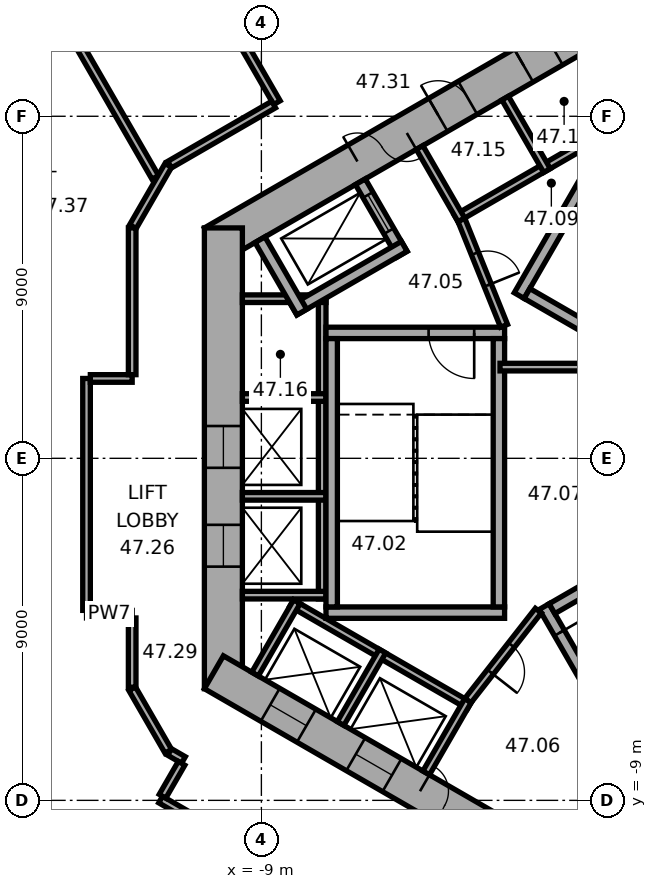
"""IFC4 building model, lengths in metres.
Left out: names, types, materials, properties, quantities, classifications, styles, units other than length and angle.
Written with IfcOpenShell. Run it as: python <this file> out.ifc"""

import sys

from ifc_helpers import new_model, si_unit, direction, frame, frame_2d, origin, place, context, subcontext, project, spatial, rectangle, extrude, element, fill, save


model = new_model("IFC4")
c1 = context("Model", 3, precision=1e-05, world=origin(), true_north=direction((0.0, 1.0)))
c2 = subcontext(c1, "Body", "Model", "MODEL_VIEW")
j1 = project(units=[si_unit("LENGTHUNIT", "METRE"), si_unit("PLANEANGLEUNIT", "RADIAN")], contexts=[c1])
p1 = place(None, origin())
s1 = spatial("IfcSite", under=j1, at=p1, CompositionType="ELEMENT")
p2 = place(p1, origin())
s2 = spatial("IfcBuilding", under=s1, at=p2, CompositionType="ELEMENT")
p3 = place(p2, frame((0.0, 0.0, 191.0)))
s3 = spatial("IfcBuildingStorey", under=s2, at=p3, CompositionType="ELEMENT", Elevation=191.0)
p4 = place(p3, frame((0.25, 11.691, 0.0), z_axis=(0.0, 0.0, 1.0), x_axis=(-0.866022616891, -0.50000482701, 0.0)))
e1 = element("IfcWall", 1, at=p4, inside=s3, PredefinedType="SHEAR", context=c2, shape_type="SweptSolid", body=[
    extrude(rectangle(XDim=12.125, YDim=1.0, at=frame_2d((6.062, 0.0))), origin(), (0.0, 0.0, 1.0), 3.7),
])
p5 = place(p4, frame((6.262, 0.0, 0.0)))
e2 = element("IfcOpeningElement", 2, at=p5, cuts=e1, PredefinedType="OPENING", context=c2, shape_type="SweptSolid", body=[
    extrude(rectangle(XDim=1.5, YDim=2.1, at=frame_2d((0.75, 1.05))), frame((0.0, 0.51, 0.0), z_axis=(0.0, -1.0, 0.0), x_axis=(1.0, 0.0, 0.0)), (0.0, 0.0, 1.0), 1.02),
])
p6 = place(p4, frame((1.812, 0.0, 0.0)))
e3 = element("IfcOpeningElement", 3, at=p6, cuts=e1, PredefinedType="OPENING", context=c2, shape_type="SweptSolid", body=[
    extrude(rectangle(XDim=0.9, YDim=2.1, at=frame_2d((0.45, 1.05))), frame((0.0, 0.51, 0.0), z_axis=(0.0, -1.0, 0.0), x_axis=(1.0, 0.0, 0.0)), (0.0, 0.0, 1.0), 1.02),
])
p7 = place(p4, frame((4.412, 0.0, 0.0)))
e4 = element("IfcOpeningElement", 4, at=p7, cuts=e1, PredefinedType="OPENING", context=c2, shape_type="SweptSolid", body=[
    extrude(rectangle(XDim=0.9, YDim=2.1, at=frame_2d((0.45, 1.05))), frame((0.0, 0.51, 0.0), z_axis=(0.0, -1.0, 0.0), x_axis=(1.0, 0.0, 0.0)), (0.0, 0.0, 1.0), 1.02),
])
p8 = place(p3, frame((-10.0, 6.062, 0.0), z_axis=(0.0, 0.0, 1.0), x_axis=(0.0, -1.0, 0.0)))
e5 = element("IfcWall", 5, at=p8, inside=s3, PredefinedType="SHEAR", context=c2, shape_type="SweptSolid", body=[
    extrude(rectangle(XDim=12.125, YDim=1.0, at=frame_2d((6.062, 0.0))), origin(), (0.0, 0.0, 1.0), 3.7),
])
p9 = place(p8, frame((5.212, 0.0, 0.0)))
e6 = element("IfcOpeningElement", 6, at=p9, cuts=e5, PredefinedType="OPENING", context=c2, shape_type="SweptSolid", body=[
    extrude(rectangle(XDim=1.1, YDim=2.1, at=frame_2d((0.55, 1.05))), frame((0.0, 0.51, 0.0), z_axis=(0.0, -1.0, 0.0), x_axis=(1.0, 0.0, 0.0)), (0.0, 0.0, 1.0), 1.02),
])
p10 = place(p8, frame((7.812, 0.0, 0.0)))
e7 = element("IfcOpeningElement", 7, at=p10, cuts=e5, PredefinedType="OPENING", context=c2, shape_type="SweptSolid", body=[
    extrude(rectangle(XDim=1.1, YDim=2.1, at=frame_2d((0.55, 1.05))), frame((0.0, 0.51, 0.0), z_axis=(0.0, -1.0, 0.0), x_axis=(1.0, 0.0, 0.0)), (0.0, 0.0, 1.0), 1.02),
])
p11 = place(p3, frame((-10.25, -5.629, 0.0), z_axis=(0.0, 0.0, 1.0), x_axis=(0.866022616891, -0.50000482701, 0.0)))
e8 = element("IfcWall", 8, at=p11, inside=s3, PredefinedType="SHEAR", context=c2, shape_type="SweptSolid", body=[
    extrude(rectangle(XDim=12.125, YDim=1.0, at=frame_2d((6.062, 0.0))), origin(), (0.0, 0.0, 1.0), 3.7),
])
p12 = place(p11, frame((6.262, 0.0, 0.0)))
e9 = element("IfcOpeningElement", 9, at=p12, cuts=e8, PredefinedType="OPENING", context=c2, shape_type="SweptSolid", body=[
    extrude(rectangle(XDim=1.5, YDim=2.1, at=frame_2d((0.75, 1.05))), frame((0.0, 0.51, 0.0), z_axis=(0.0, -1.0, 0.0), x_axis=(1.0, 0.0, 0.0)), (0.0, 0.0, 1.0), 1.02),
])
p13 = place(p11, frame((1.712, 0.0, 0.0)))
e10 = element("IfcOpeningElement", 10, at=p13, cuts=e8, PredefinedType="OPENING", context=c2, shape_type="SweptSolid", body=[
    extrude(rectangle(XDim=1.1, YDim=2.1, at=frame_2d((0.55, 1.05))), frame((0.0, 0.51, 0.0), z_axis=(0.0, -1.0, 0.0), x_axis=(1.0, 0.0, 0.0)), (0.0, 0.0, 1.0), 1.02),
])
p14 = place(p11, frame((4.312, 0.0, 0.0)))
e11 = element("IfcOpeningElement", 11, at=p14, cuts=e8, PredefinedType="OPENING", context=c2, shape_type="SweptSolid", body=[
    extrude(rectangle(XDim=1.1, YDim=2.1, at=frame_2d((0.55, 1.05))), frame((0.0, 0.51, 0.0), z_axis=(0.0, -1.0, 0.0), x_axis=(1.0, 0.0, 0.0)), (0.0, 0.0, 1.0), 1.02),
])
p15 = place(p3, frame((0.803, 9.009, 0.0), z_axis=(0.0, 0.0, 1.0), x_axis=(-0.866028230842, -0.499995103361, 0.0)))
e12 = element("IfcWall", 12, at=p15, inside=s3, PredefinedType="PARTITIONING", context=c2, shape_type="SweptSolid", body=[
    extrude(rectangle(XDim=5.4, YDim=0.2, at=frame_2d((2.7, 0.0))), origin(), (0.0, 0.0, 1.0), 3.42),
])
for number, where, z_axis, x_axis in (
    (13, (-1.485, 7.572, 0.0), (0.0, 0.0, 1.0), (-0.5, 0.866, 0.0)),
    (14, (-3.737, 6.272, 0.0), (0.0, 0.0, 1.0), (-0.5, 0.866, 0.0)),
):
    element("IfcWall", number, at=place(p3, frame(where, z_axis=z_axis, x_axis=x_axis)), inside=s3, PredefinedType="PARTITIONING", context=c2, shape_type="SweptSolid", body=[
        extrude(rectangle(XDim=2.2, YDim=0.2, at=frame_2d((1.1, 0.0))), origin(), (0.0, 0.0, 1.0), 3.42),
    ])
p16 = place(p3, frame((-7.4, 4.3, 0.0), z_axis=(0.0, 0.0, 1.0), x_axis=(0.0, -1.0, 0.0)))
e15 = element("IfcWall", 15, at=p16, inside=s3, PredefinedType="PARTITIONING", context=c2, shape_type="SweptSolid", body=[
    extrude(rectangle(XDim=8.0, YDim=0.2, at=frame_2d((4.0, 0.0))), origin(), (0.0, 0.0, 1.0), 3.42),
])
for number, where, z_axis, x_axis in (
    (16, (-7.3, 4.2, 0.0), (0.0, 0.0, 1.0), (-1.0, 0.0, 0.0)),
    (17, (-7.3, 1.6, 0.0), (0.0, 0.0, 1.0), (-1.0, 0.0, 0.0)),
    (18, (-7.3, -1.0, 0.0), (0.0, 0.0, 1.0), (-1.0, 0.0, 0.0)),
    (19, (-7.3, -3.6, 0.0), (0.0, 0.0, 1.0), (-1.0, 0.0, 0.0)),
):
    element("IfcWall", number, at=place(p3, frame(where, z_axis=z_axis, x_axis=x_axis)), inside=s3, PredefinedType="PARTITIONING", context=c2, shape_type="SweptSolid", body=[
        extrude(rectangle(XDim=2.2, YDim=0.2, at=frame_2d((1.1, 0.0))), origin(), (0.0, 0.0, 1.0), 3.42),
    ])
p17 = place(p3, frame((-8.203, -3.809, 0.0), z_axis=(0.0, 0.0, 1.0), x_axis=(0.866028230842, -0.499995103361, 0.0)))
e20 = element("IfcWall", 20, at=p17, inside=s3, PredefinedType="PARTITIONING", context=c2, shape_type="SweptSolid", body=[
    extrude(rectangle(XDim=5.4, YDim=0.2, at=frame_2d((2.7, 0.0))), origin(), (0.0, 0.0, 1.0), 3.42),
])
for number, where, z_axis, x_axis in (
    (21, (-8.067, -3.772, 0.0), (0.0, 0.0, 1.0), (-0.5, -0.866, 0.0)),
    (22, (-5.815, -5.072, 0.0), (0.0, 0.0, 1.0), (-0.5, -0.866, 0.0)),
):
    element("IfcWall", number, at=place(p3, frame(where, z_axis=z_axis, x_axis=x_axis)), inside=s3, PredefinedType="PARTITIONING", context=c2, shape_type="SweptSolid", body=[
        extrude(rectangle(XDim=2.2, YDim=0.2, at=frame_2d((1.1, 0.0))), origin(), (0.0, 0.0, 1.0), 3.42),
    ])
p18 = place(p3, frame((-3.563, -6.372, 0.0), z_axis=(0.0, 0.0, 1.0), x_axis=(-0.499994660107, -0.866028486751, 0.0)))
e23 = element("IfcWall", 23, at=p18, inside=s3, PredefinedType="PARTITIONING", context=c2, shape_type="SweptSolid", body=[
    extrude(rectangle(XDim=2.2, YDim=0.2, at=frame_2d((1.1, 0.0))), origin(), (0.0, 0.0, 1.0), 3.42),
])
p19 = place(p3, frame((-2.216, 4.282, 0.0), z_axis=(0.0, 0.0, 1.0), x_axis=(0.499977259774, 0.866038532462, 0.0)))
e24 = element("IfcWall", 24, at=p19, inside=s3, PredefinedType="SHEAR", context=c2, shape_type="SweptSolid", body=[
    extrude(rectangle(XDim=4.7, YDim=0.3, at=frame_2d((2.35, 0.0))), origin(), (0.0, 0.0, 1.0), 3.42),
])
p20 = place(p3, frame((4.103, 0.807, 0.0), z_axis=(0.0, 0.0, 1.0), x_axis=(-0.866027801685, 0.499995846692, 0.0)))
e25 = element("IfcWall", 25, at=p20, inside=s3, PredefinedType="SHEAR", context=c2, shape_type="SweptSolid", body=[
    extrude(rectangle(XDim=7.06, YDim=0.3, at=frame_2d((3.53, 0.0))), origin(), (0.0, 0.0, 1.0), 3.42),
])
p21 = place(p3, frame((-2.6, 3.3, 0.0), z_axis=(0.0, 0.0, 1.0), x_axis=(-1.0, 0.0, 0.0)))
e26 = element("IfcWall", 26, at=p21, inside=s3, PredefinedType="SHEAR", context=c2, shape_type="SweptSolid", body=[
    extrude(rectangle(XDim=4.7, YDim=0.3, at=frame_2d((2.35, 0.0))), origin(), (0.0, 0.0, 1.0), 3.42),
])
p22 = place(p21, frame((0.8, 0.0, 0.0)))
e27 = element("IfcOpeningElement", 27, at=p22, cuts=e26, PredefinedType="OPENING", context=c2, shape_type="SweptSolid", body=[
    extrude(rectangle(XDim=1.2, YDim=2.1, at=frame_2d((0.6, 1.05))), frame((0.0, 0.16, 0.0), z_axis=(0.0, -1.0, 0.0), x_axis=(1.0, 0.0, 0.0)), (0.0, 0.0, 1.0), 0.32),
])
p23 = place(p3, frame((-2.6, -4.06, 0.0), z_axis=(0.0, 0.0, 1.0), x_axis=(-1.0, 0.0, 0.0)))
e28 = element("IfcWall", 28, at=p23, inside=s3, PredefinedType="SHEAR", context=c2, shape_type="SweptSolid", body=[
    extrude(rectangle(XDim=4.7, YDim=0.3, at=frame_2d((2.35, 0.0))), origin(), (0.0, 0.0, 1.0), 3.42),
])
for number, where, z_axis, x_axis in (
    (29, (-2.75, 3.15, 0.0), (0.0, 0.0, 1.0), (0.0, -1.0, 0.0)),
    (30, (-7.15, 3.15, 0.0), (0.0, 0.0, 1.0), (0.0, -1.0, 0.0)),
):
    element("IfcWall", number, at=place(p3, frame(where, z_axis=z_axis, x_axis=x_axis)), inside=s3, PredefinedType="SHEAR", context=c2, shape_type="SweptSolid", body=[
        extrude(rectangle(XDim=7.06, YDim=0.3, at=frame_2d((3.53, 0.0))), origin(), (0.0, 0.0, 1.0), 3.42),
    ])
p24 = place(p3, frame((-1.558, -3.902, 0.0), z_axis=(0.0, 0.0, 1.0), x_axis=(0.499977259774, -0.866038532462, 0.0)))
e31 = element("IfcWall", 31, at=p24, inside=s3, PredefinedType="SHEAR", context=c2, shape_type="SweptSolid", body=[
    extrude(rectangle(XDim=4.7, YDim=0.3, at=frame_2d((2.35, 0.0))), origin(), (0.0, 0.0, 1.0), 3.42),
])
p25 = place(p24, frame((0.8, 0.0, 0.0)))
e32 = element("IfcOpeningElement", 32, at=p25, cuts=e31, PredefinedType="OPENING", context=c2, shape_type="SweptSolid", body=[
    extrude(rectangle(XDim=1.2, YDim=2.1, at=frame_2d((0.6, 1.05))), frame((0.0, 0.16, 0.0), z_axis=(0.0, -1.0, 0.0), x_axis=(1.0, 0.0, 0.0)), (0.0, 0.0, 1.0), 0.32),
])
p26 = place(p3, frame((-1.353, -3.957, 0.0), z_axis=(0.0, 0.0, 1.0), x_axis=(0.866027801685, 0.499995846692, 0.0)))
e33 = element("IfcWall", 33, at=p26, inside=s3, PredefinedType="SHEAR", context=c2, shape_type="SweptSolid", body=[
    extrude(rectangle(XDim=7.06, YDim=0.3, at=frame_2d((3.53, 0.0))), origin(), (0.0, 0.0, 1.0), 3.42),
])
p27 = place(p3, frame((-5.295, 5.372, 0.0), z_axis=(0.0, 0.0, 1.0), x_axis=(-0.500077893725, 0.86598042715, 0.0)))
e34 = element("IfcWall", 34, at=p27, inside=s3, PredefinedType="SHEAR", context=c2, shape_type="SweptSolid", body=[
    extrude(rectangle(XDim=2.2, YDim=0.3, at=frame_2d((1.1, 0.0))), origin(), (0.0, 0.0, 1.0), 3.42),
])
p28 = place(p27, frame((0.7, 0.0, 0.0)))
e35 = element("IfcOpeningElement", 35, at=p28, cuts=e34, PredefinedType="OPENING", context=c2, shape_type="SweptSolid", body=[
    extrude(rectangle(XDim=1.1, YDim=2.1, at=frame_2d((0.55, 1.05))), frame((0.0, 0.16, 0.0), z_axis=(0.0, -1.0, 0.0), x_axis=(1.0, 0.0, 0.0)), (0.0, 0.0, 1.0), 0.32),
])
p29 = place(p3, frame((-5.24, 5.577, 0.0), z_axis=(0.0, 0.0, 1.0), x_axis=(-0.866014461049, -0.500018952895, 0.0)))
e36 = element("IfcWall", 36, at=p29, inside=s3, PredefinedType="SHEAR", context=c2, shape_type="SweptSolid", body=[
    extrude(rectangle(XDim=3.35, YDim=0.3, at=frame_2d((1.675, 0.0))), origin(), (0.0, 0.0, 1.0), 3.42),
])
p30 = place(p3, frame((-7.937, 3.847, 0.0), z_axis=(0.0, 0.0, 1.0), x_axis=(-0.50002983664, 0.866008176907, 0.0)))
e37 = element("IfcWall", 37, at=p30, inside=s3, PredefinedType="SHEAR", context=c2, shape_type="SweptSolid", body=[
    extrude(rectangle(XDim=2.2, YDim=0.3, at=frame_2d((1.1, 0.0))), origin(), (0.0, 0.0, 1.0), 3.42),
])
p31 = place(p3, frame((-2.615, 3.487, 0.0), z_axis=(0.0, 0.0, 1.0), x_axis=(-0.373576831041, 0.92759924068, 0.0)))
e38 = element("IfcWall", 38, at=p31, inside=s3, PredefinedType="PARTITIONING", context=c2, shape_type="SweptSolid", body=[
    extrude(rectangle(XDim=3.002, YDim=0.2, at=frame_2d((1.501, 0.0))), origin(), (0.0, 0.0, 1.0), 3.42),
])
p32 = place(p31, frame((1.15, 0.0, 0.0)))
e39 = element("IfcOpeningElement", 39, at=p32, cuts=e38, PredefinedType="OPENING", context=c2, shape_type="SweptSolid", body=[
    extrude(rectangle(XDim=0.9, YDim=2.1, at=frame_2d((0.45, 1.05))), frame((0.0, 0.11, 0.0), z_axis=(0.0, -1.0, 0.0), x_axis=(1.0, 0.0, 0.0)), (0.0, 0.0, 1.0), 0.22),
])
p33 = place(p3, frame((-1.712, -4.008, 0.0), z_axis=(0.0, 0.0, 1.0), x_axis=(-0.616549420702, -0.787316208287, 0.0)))
e40 = element("IfcWall", 40, at=p33, inside=s3, PredefinedType="PARTITIONING", context=c2, shape_type="SweptSolid", body=[
    extrude(rectangle(XDim=3.002, YDim=0.2, at=frame_2d((1.501, 0.0))), origin(), (0.0, 0.0, 1.0), 3.42),
])
p34 = place(p33, frame((1.15, 0.0, 0.0)))
e41 = element("IfcOpeningElement", 41, at=p34, cuts=e40, PredefinedType="OPENING", context=c2, shape_type="SweptSolid", body=[
    extrude(rectangle(XDim=0.9, YDim=2.1, at=frame_2d((0.45, 1.05))), frame((0.0, 0.11, 0.0), z_axis=(0.0, -1.0, 0.0), x_axis=(1.0, 0.0, 0.0)), (0.0, 0.0, 1.0), 0.22),
])
p35 = place(p3, frame((-2.72, 2.4, 0.0), z_axis=(0.0, 0.0, 1.0), x_axis=(1.0, 0.0, 0.0)))
e42 = element("IfcWall", 42, at=p35, inside=s3, PredefinedType="PARTITIONING", context=c2, shape_type="SweptSolid", body=[
    extrude(rectangle(XDim=3.883, YDim=0.2, at=frame_2d((1.941, 0.0))), origin(), (0.0, 0.0, 1.0), 3.42),
])
p36 = place(p3, frame((-16.018, 14.712, 0.0), z_axis=(0.0, 0.0, 1.0), x_axis=(0.500000843414, -0.866024916838, 0.0)))
e43 = element("IfcWall", 43, at=p36, inside=s3, PredefinedType="PARTITIONING", context=c2, shape_type="SweptSolid", body=[
    extrude(rectangle(XDim=8.452, YDim=0.2, at=frame_2d((4.226, 0.0))), origin(), (0.0, 0.0, 1.0), 3.42),
])
p37 = place(p3, frame((-13.601, -4.101, 0.0), z_axis=(0.0, 0.0, 1.0), x_axis=(1.0, 0.0, 0.0)))
e44 = element("IfcWall", 44, at=p37, inside=s3, PredefinedType="PARTITIONING", context=c2, shape_type="SweptSolid", body=[
    extrude(rectangle(XDim=1.201, YDim=0.2, at=frame_2d((0.601, 0.0))), origin(), (0.0, 0.0, 1.0), 3.42),
])
p38 = place(p3, frame((-13.601, 2.101, 0.0), z_axis=(0.0, 0.0, 1.0), x_axis=(0.0, -1.0, 0.0)))
e45 = element("IfcWall", 45, at=p38, inside=s3, PredefinedType="PARTITIONING", context=c2, shape_type="SweptSolid", body=[
    extrude(rectangle(XDim=6.102, YDim=0.2, at=frame_2d((3.051, 0.0))), origin(), (0.0, 0.0, 1.0), 3.42),
])
p39 = place(p3, frame((-12.766, 16.589, 0.0), z_axis=(0.0, 0.0, 1.0), x_axis=(0.500010139422, -0.866019549707, 0.0)))
e46 = element("IfcWall", 46, at=p39, inside=s3, PredefinedType="PARTITIONING", context=c2, shape_type="SweptSolid", body=[
    extrude(rectangle(XDim=8.35, YDim=0.2, at=frame_2d((4.175, 0.0))), origin(), (0.0, 0.0, 1.0), 3.42),
])
p40 = place(p39, frame((3.675, 0.0, 0.0)))
e47 = element("IfcOpeningElement", 47, at=p40, cuts=e46, PredefinedType="OPENING", context=c2, shape_type="SweptSolid", body=[
    extrude(rectangle(XDim=1.0, YDim=2.1, at=frame_2d((0.5, 1.05))), frame((0.0, 0.11, 0.0), z_axis=(0.0, -1.0, 0.0), x_axis=(1.0, 0.0, 0.0)), (0.0, 0.0, 1.0), 0.22),
])
p41 = place(p3, frame((-12.4, -6.062, 0.0), z_axis=(0.0, 0.0, 1.0), x_axis=(0.500022797313, -0.86601224135, 0.0)))
e48 = element("IfcWall", 48, at=p41, inside=s3, PredefinedType="PARTITIONING", context=c2, shape_type="SweptSolid", body=[
    extrude(rectangle(XDim=1.9, YDim=0.2, at=frame_2d((0.95, 0.0))), origin(), (0.0, 0.0, 1.0), 3.42),
])
p42 = place(p3, frame((-12.4, -4.201, 0.0), z_axis=(0.0, 0.0, 1.0), x_axis=(0.0, -1.0, 0.0)))
e49 = element("IfcWall", 49, at=p42, inside=s3, PredefinedType="PARTITIONING", context=c2, shape_type="SweptSolid", body=[
    extrude(rectangle(XDim=1.821, YDim=0.2, at=frame_2d((0.911, 0.0))), origin(), (0.0, 0.0, 1.0), 3.42),
])
p43 = place(p3, frame((-12.4, 2.101, 0.0), z_axis=(0.0, 0.0, 1.0), x_axis=(-1.0, 0.0, 0.0)))
e50 = element("IfcWall", 50, at=p43, inside=s3, PredefinedType="PARTITIONING", context=c2, shape_type="SweptSolid", body=[
    extrude(rectangle(XDim=1.101, YDim=0.2, at=frame_2d((0.551, 0.0))), origin(), (0.0, 0.0, 1.0), 3.42),
])
p44 = place(p3, frame((-12.4, 6.062, 0.0), z_axis=(0.0, 0.0, 1.0), x_axis=(0.0, -1.0, 0.0)))
e51 = element("IfcWall", 51, at=p44, inside=s3, PredefinedType="PARTITIONING", context=c2, shape_type="SweptSolid", body=[
    extrude(rectangle(XDim=3.861, YDim=0.2, at=frame_2d((1.931, 0.0))), origin(), (0.0, 0.0, 1.0), 3.42),
])
p45 = place(p3, frame((-11.651, -8.978, 0.0), z_axis=(0.0, 0.0, 1.0), x_axis=(0.866010893236, -0.500025132165, 0.0)))
e52 = element("IfcWall", 52, at=p45, inside=s3, PredefinedType="PARTITIONING", context=c2, shape_type="SweptSolid", body=[
    extrude(rectangle(XDim=4.608, YDim=0.2, at=frame_2d((2.304, 0.0))), origin(), (0.0, 0.0, 1.0), 3.42),
])
p46 = place(p3, frame((-11.45, 7.708, 0.0), z_axis=(0.0, 0.0, 1.0), x_axis=(-0.499964847546, -0.866045698112, 0.0)))
e53 = element("IfcWall", 53, at=p46, inside=s3, PredefinedType="PARTITIONING", context=c2, shape_type="SweptSolid", body=[
    extrude(rectangle(XDim=1.86, YDim=0.2, at=frame_2d((0.93, 0.0))), origin(), (0.0, 0.0, 1.0), 3.42),
])
p47 = place(p3, frame((-11.415, -7.728, 0.0), z_axis=(0.0, 0.0, 1.0), x_axis=(0.865915281873, -0.500190688257, 0.0)))
e54 = element("IfcWall", 54, at=p47, inside=s3, PredefinedType="PARTITIONING", context=c2, shape_type="SweptSolid", body=[
    extrude(rectangle(XDim=0.421, YDim=0.2, at=frame_2d((0.21, 0.0))), origin(), (0.0, 0.0, 1.0), 3.42),
])
p48 = place(p3, frame((-11.101, -8.025, 0.0), z_axis=(0.0, 0.0, 1.0), x_axis=(-0.500074377092, -0.865982457891, 0.0)))
e55 = element("IfcWall", 55, at=p48, inside=s3, PredefinedType="PARTITIONING", context=c2, shape_type="SweptSolid", body=[
    extrude(rectangle(XDim=1.001, YDim=0.2, at=frame_2d((0.5, 0.0))), origin(), (0.0, 0.0, 1.0), 3.42),
])
p49 = place(p3, frame((-8.678, 9.308, 0.0), z_axis=(0.0, 0.0, 1.0), x_axis=(-0.866000359435, -0.500043375578, 0.0)))
e56 = element("IfcWall", 56, at=p49, inside=s3, PredefinedType="PARTITIONING", context=c2, shape_type="SweptSolid", body=[
    extrude(rectangle(XDim=3.161, YDim=0.2, at=frame_2d((1.581, 0.0))), origin(), (0.0, 0.0, 1.0), 3.42),
])
p50 = place(p5, origin())
e57 = element("IfcDoor", 57, at=p50, inside=s3, OperationType="DOUBLE_DOOR_SINGLE_SWING", PredefinedType="DOOR", context=c2, shape_type="SweptSolid", body=[
    extrude(rectangle(XDim=1.5, YDim=2.1, at=frame_2d((0.75, 1.05))), frame((0.0, 0.025, 0.0), z_axis=(0.0, -1.0, 0.0), x_axis=(1.0, 0.0, 0.0)), (0.0, 0.0, 1.0), 0.05),
])
fill(e2, e57)
p51 = place(p12, origin())
e58 = element("IfcDoor", 58, at=p51, inside=s3, OperationType="DOUBLE_DOOR_SINGLE_SWING", PredefinedType="DOOR", context=c2, shape_type="SweptSolid", body=[
    extrude(rectangle(XDim=1.5, YDim=2.1, at=frame_2d((0.75, 1.05))), frame((0.0, 0.025, 0.0), z_axis=(0.0, -1.0, 0.0), x_axis=(1.0, 0.0, 0.0)), (0.0, 0.0, 1.0), 0.05),
])
fill(e9, e58)
p52 = place(p22, origin())
e59 = element("IfcDoor", 59, at=p52, inside=s3, OperationType="SINGLE_SWING_RIGHT", PredefinedType="DOOR", context=c2, shape_type="SweptSolid", body=[
    extrude(rectangle(XDim=1.2, YDim=2.1, at=frame_2d((0.6, 1.05))), frame((0.0, 0.025, 0.0), z_axis=(0.0, -1.0, 0.0), x_axis=(1.0, 0.0, 0.0)), (0.0, 0.0, 1.0), 0.05),
])
fill(e27, e59)
p53 = place(p25, origin())
e60 = element("IfcDoor", 60, at=p53, inside=s3, OperationType="SINGLE_SWING_RIGHT", PredefinedType="DOOR", context=c2, shape_type="SweptSolid", body=[
    extrude(rectangle(XDim=1.2, YDim=2.1, at=frame_2d((0.6, 1.05))), frame((0.0, 0.025, 0.0), z_axis=(0.0, -1.0, 0.0), x_axis=(1.0, 0.0, 0.0)), (0.0, 0.0, 1.0), 0.05),
])
fill(e32, e60)
p54 = place(p32, origin())
e61 = element("IfcDoor", 61, at=p54, inside=s3, OperationType="SINGLE_SWING_LEFT", PredefinedType="DOOR", context=c2, shape_type="SweptSolid", body=[
    extrude(rectangle(XDim=0.9, YDim=2.1, at=frame_2d((0.45, 1.05))), frame((0.0, 0.025, 0.0), z_axis=(0.0, -1.0, 0.0), x_axis=(1.0, 0.0, 0.0)), (0.0, 0.0, 1.0), 0.05),
])
fill(e39, e61)
p55 = place(p34, origin())
e62 = element("IfcDoor", 62, at=p55, inside=s3, OperationType="SINGLE_SWING_LEFT", PredefinedType="DOOR", context=c2, shape_type="SweptSolid", body=[
    extrude(rectangle(XDim=0.9, YDim=2.1, at=frame_2d((0.45, 1.05))), frame((0.0, 0.025, 0.0), z_axis=(0.0, -1.0, 0.0), x_axis=(1.0, 0.0, 0.0)), (0.0, 0.0, 1.0), 0.05),
])
fill(e41, e62)
p56 = place(p6, origin())
e63 = element("IfcDoor", 63, at=p56, inside=s3, OperationType="SINGLE_SWING_LEFT", PredefinedType="DOOR", context=c2, shape_type="SweptSolid", body=[
    extrude(rectangle(XDim=0.9, YDim=2.1, at=frame_2d((0.45, 1.05))), frame((0.0, 0.025, 0.0), z_axis=(0.0, -1.0, 0.0), x_axis=(1.0, 0.0, 0.0)), (0.0, 0.0, 1.0), 0.05),
])
fill(e3, e63)
p57 = place(p7, origin())
e64 = element("IfcDoor", 64, at=p57, inside=s3, OperationType="SINGLE_SWING_LEFT", PredefinedType="DOOR", context=c2, shape_type="SweptSolid", body=[
    extrude(rectangle(XDim=0.9, YDim=2.1, at=frame_2d((0.45, 1.05))), frame((0.0, 0.025, 0.0), z_axis=(0.0, -1.0, 0.0), x_axis=(1.0, 0.0, 0.0)), (0.0, 0.0, 1.0), 0.05),
])
fill(e4, e64)
p58 = place(p28, origin())
e65 = element("IfcDoor", 65, at=p58, inside=s3, OperationType="DOUBLE_DOOR_SLIDING", PredefinedType="DOOR", context=c2, shape_type="SweptSolid", body=[
    extrude(rectangle(XDim=1.1, YDim=2.1, at=frame_2d((0.55, 1.05))), frame((0.0, 0.025, 0.0), z_axis=(0.0, -1.0, 0.0), x_axis=(1.0, 0.0, 0.0)), (0.0, 0.0, 1.0), 0.05),
])
fill(e35, e65)
p59 = place(p9, origin())
e66 = element("IfcDoor", 66, at=p59, inside=s3, OperationType="DOUBLE_DOOR_SLIDING", PredefinedType="DOOR", context=c2, shape_type="SweptSolid", body=[
    extrude(rectangle(XDim=1.1, YDim=2.1, at=frame_2d((0.55, 1.05))), frame((0.0, 0.025, 0.0), z_axis=(0.0, -1.0, 0.0), x_axis=(1.0, 0.0, 0.0)), (0.0, 0.0, 1.0), 0.05),
])
fill(e6, e66)
p60 = place(p10, origin())
e67 = element("IfcDoor", 67, at=p60, inside=s3, OperationType="DOUBLE_DOOR_SLIDING", PredefinedType="DOOR", context=c2, shape_type="SweptSolid", body=[
    extrude(rectangle(XDim=1.1, YDim=2.1, at=frame_2d((0.55, 1.05))), frame((0.0, 0.025, 0.0), z_axis=(0.0, -1.0, 0.0), x_axis=(1.0, 0.0, 0.0)), (0.0, 0.0, 1.0), 0.05),
])
fill(e7, e67)
p61 = place(p13, origin())
e68 = element("IfcDoor", 68, at=p61, inside=s3, OperationType="DOUBLE_DOOR_SLIDING", PredefinedType="DOOR", context=c2, shape_type="SweptSolid", body=[
    extrude(rectangle(XDim=1.1, YDim=2.1, at=frame_2d((0.55, 1.05))), frame((0.0, 0.025, 0.0), z_axis=(0.0, -1.0, 0.0), x_axis=(1.0, 0.0, 0.0)), (0.0, 0.0, 1.0), 0.05),
])
fill(e10, e68)
p62 = place(p14, origin())
e69 = element("IfcDoor", 69, at=p62, inside=s3, OperationType="DOUBLE_DOOR_SLIDING", PredefinedType="DOOR", context=c2, shape_type="SweptSolid", body=[
    extrude(rectangle(XDim=1.1, YDim=2.1, at=frame_2d((0.55, 1.05))), frame((0.0, 0.025, 0.0), z_axis=(0.0, -1.0, 0.0), x_axis=(1.0, 0.0, 0.0)), (0.0, 0.0, 1.0), 0.05),
])
fill(e11, e69)
save(model, sys.argv[1])
